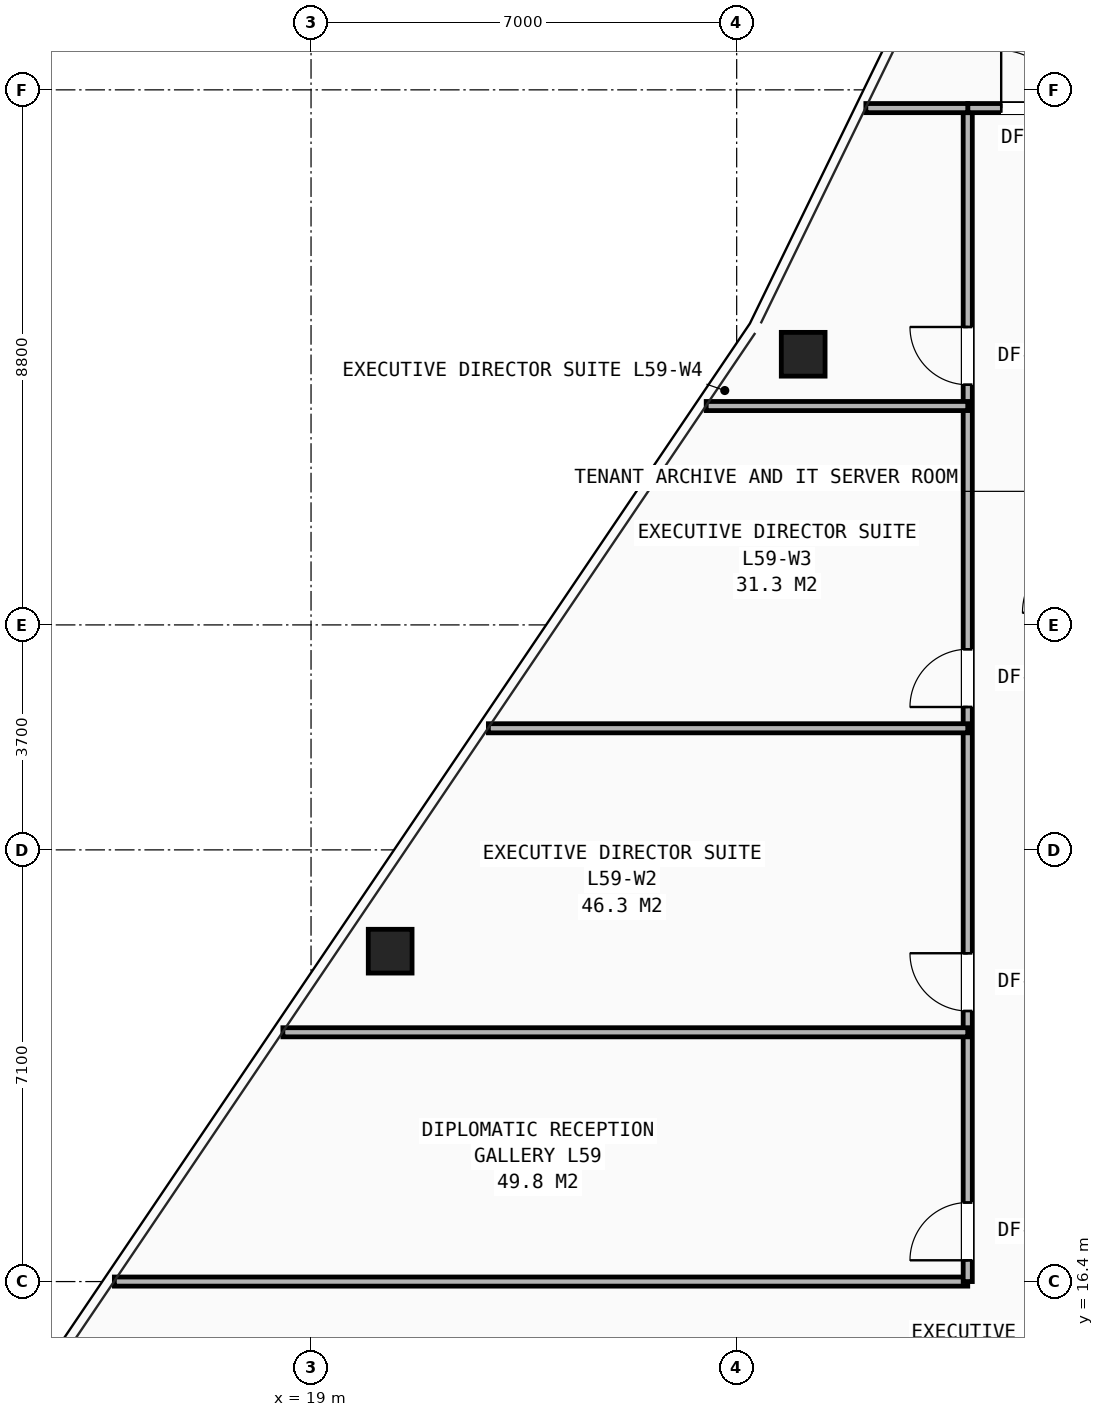
"""IFC4 building model, lengths in metres.
Left out: names, types, materials, properties, quantities, classifications, styles, units other than length and angle.
Written with IfcOpenShell. Run it as: python <this file> out.ifc"""

import sys

from ifc_helpers import new_model, si_unit, direction, frame, frame_2d, origin, origin_2d, place, context, subcontext, project, spatial, rectangle, hollow_rectangle, extrude, element, fill, save


model = new_model("IFC4")
c1 = context("Model", 3, precision=1e-05, world=origin(), true_north=direction((0.0, 1.0)))
c2 = subcontext(c1, "Body", "Model", "MODEL_VIEW")
j1 = project(units=[si_unit("LENGTHUNIT", "METRE"), si_unit("PLANEANGLEUNIT", "RADIAN")], contexts=[c1])
p1 = place(None, origin())
s1 = spatial("IfcSite", under=j1, at=p1, CompositionType="ELEMENT")
p2 = place(p1, origin())
s2 = spatial("IfcBuilding", under=s1, at=p2, CompositionType="ELEMENT")
p3 = place(p2, frame((0.0, 0.0, 208.4)))
s3 = spatial("IfcBuildingStorey", under=s2, at=p3, CompositionType="ELEMENT", Elevation=208.4)
for number, where, z_axis, x_axis in (
    (1, (27.094, 31.652, 0.0), (0.0, 0.0, 1.0), (1.0, 0.0, 0.0)),
    (2, (20.302, 21.834, 0.0), (0.0, 0.0, 1.0), (1.0, 0.0, 0.0)),
):
    element("IfcColumn", number, at=place(p3, frame(where, z_axis=z_axis, x_axis=x_axis)), inside=s3, PredefinedType="COLUMN", context=c2, shape_type="SweptSolid", body=[
        extrude(hollow_rectangle(XDim=0.72, YDim=0.72, WallThickness=0.05, at=origin_2d()), origin(), (0.0, 0.0, 1.0), 3.5),
    ])
p4 = place(p3, frame((15.766, 16.4, 0.0), z_axis=(0.0, 0.0, 1.0), x_axis=(1.0, 0.0, 0.0)))
e3 = element("IfcWall", 3, at=p4, inside=s3, PredefinedType="PARTITIONING", context=c2, shape_type="SweptSolid", body=[
    extrude(rectangle(XDim=14.034, YDim=0.15, at=frame_2d((7.017, 0.0))), origin(), (0.0, 0.0, 1.0), 2.292),
])
p5 = place(p3, frame((29.8, 16.4, 0.0), z_axis=(0.0, 0.0, 1.0), x_axis=(0.0, 1.0, 0.0)))
e4 = element("IfcWall", 4, at=p5, inside=s3, PredefinedType="PARTITIONING", context=c2, shape_type="SweptSolid", body=[
    extrude(rectangle(XDim=19.3, YDim=0.15, at=frame_2d((9.65, 0.0))), origin(), (0.0, 0.0, 1.0), 2.292),
])
p6 = place(p5, frame((0.35, 0.0, 0.0)))
e5 = element("IfcOpeningElement", 5, at=p6, cuts=e4, PredefinedType="OPENING", context=c2, shape_type="SweptSolid", body=[
    extrude(rectangle(XDim=0.95, YDim=2.1, at=frame_2d((0.475, 1.05))), frame((0.0, 0.085, 0.0), z_axis=(0.0, -1.0, 0.0), x_axis=(1.0, 0.0, 0.0)), (0.0, 0.0, 1.0), 0.17),
])
p7 = place(p5, frame((4.45, 0.0, 0.0)))
e6 = element("IfcOpeningElement", 6, at=p7, cuts=e4, PredefinedType="OPENING", context=c2, shape_type="SweptSolid", body=[
    extrude(rectangle(XDim=0.95, YDim=2.1, at=frame_2d((0.475, 1.05))), frame((0.0, 0.085, 0.0), z_axis=(0.0, -1.0, 0.0), x_axis=(1.0, 0.0, 0.0)), (0.0, 0.0, 1.0), 0.17),
])
p8 = place(p5, frame((9.45, 0.0, 0.0)))
e7 = element("IfcOpeningElement", 7, at=p8, cuts=e4, PredefinedType="OPENING", context=c2, shape_type="SweptSolid", body=[
    extrude(rectangle(XDim=0.95, YDim=2.1, at=frame_2d((0.475, 1.05))), frame((0.0, 0.085, 0.0), z_axis=(0.0, -1.0, 0.0), x_axis=(1.0, 0.0, 0.0)), (0.0, 0.0, 1.0), 0.17),
])
p9 = place(p5, frame((14.75, 0.0, 0.0)))
e8 = element("IfcOpeningElement", 8, at=p9, cuts=e4, PredefinedType="OPENING", context=c2, shape_type="SweptSolid", body=[
    extrude(rectangle(XDim=0.95, YDim=2.1, at=frame_2d((0.475, 1.05))), frame((0.0, 0.085, 0.0), z_axis=(0.0, -1.0, 0.0), x_axis=(1.0, 0.0, 0.0)), (0.0, 0.0, 1.0), 0.17),
])
p10 = place(p3, frame((29.8, 35.7, 0.0), z_axis=(0.0, 0.0, 1.0), x_axis=(1.0, 0.0, 0.0)))
e9 = element("IfcWall", 9, at=p10, inside=s3, PredefinedType="PARTITIONING", context=c2, shape_type="SweptSolid", body=[
    extrude(rectangle(XDim=9.45, YDim=0.15, at=frame_2d((4.725, 0.0))), origin(), (0.0, 0.0, 1.0), 2.833),
])
p11 = place(p10, frame((0.55, 0.0, 0.0)))
e10 = element("IfcOpeningElement", 10, at=p11, cuts=e9, PredefinedType="OPENING", context=c2, shape_type="SweptSolid", body=[
    extrude(rectangle(XDim=0.95, YDim=2.1, at=frame_2d((0.475, 1.05))), frame((0.0, 0.085, 0.0), z_axis=(0.0, -1.0, 0.0), x_axis=(1.0, 0.0, 0.0)), (0.0, 0.0, 1.0), 0.17),
])
p12 = place(p10, frame((6.05, 0.0, 0.0)))
e11 = element("IfcOpeningElement", 11, at=p12, cuts=e9, PredefinedType="OPENING", context=c2, shape_type="SweptSolid", body=[
    extrude(rectangle(XDim=0.95, YDim=2.1, at=frame_2d((0.475, 1.05))), frame((0.0, 0.085, 0.0), z_axis=(0.0, -1.0, 0.0), x_axis=(1.0, 0.0, 0.0)), (0.0, 0.0, 1.0), 0.17),
])
p13 = place(p3, frame((28.124, 35.7, 0.0), z_axis=(0.0, 0.0, 1.0), x_axis=(1.0, 0.0, 0.0)))
e12 = element("IfcWall", 12, at=p13, inside=s3, PredefinedType="PARTITIONING", context=c2, shape_type="SweptSolid", body=[
    extrude(rectangle(XDim=1.676, YDim=0.15, at=frame_2d((0.838, 0.0))), origin(), (0.0, 0.0, 1.0), 2.628),
])
p14 = place(p3, frame((18.537, 20.5, 0.0), z_axis=(0.0, 0.0, 1.0), x_axis=(1.0, 0.0, 0.0)))
e13 = element("IfcWall", 13, at=p14, inside=s3, PredefinedType="PARTITIONING", context=c2, shape_type="SweptSolid", body=[
    extrude(rectangle(XDim=11.263, YDim=0.15, at=frame_2d((5.632, 0.0))), origin(), (0.0, 0.0, 1.0), 2.292),
])
p15 = place(p3, frame((21.917, 25.5, 0.0), z_axis=(0.0, 0.0, 1.0), x_axis=(1.0, 0.0, 0.0)))
e14 = element("IfcWall", 14, at=p15, inside=s3, PredefinedType="PARTITIONING", context=c2, shape_type="SweptSolid", body=[
    extrude(rectangle(XDim=7.884, YDim=0.15, at=frame_2d((3.942, 0.0))), origin(), (0.0, 0.0, 1.0), 2.628),
])
p16 = place(p3, frame((25.499, 30.8, 0.0), z_axis=(0.0, 0.0, 1.0), x_axis=(1.0, 0.0, 0.0)))
e15 = element("IfcWall", 15, at=p16, inside=s3, PredefinedType="PARTITIONING", context=c2, shape_type="SweptSolid", body=[
    extrude(rectangle(XDim=4.301, YDim=0.15, at=frame_2d((2.151, 0.0))), origin(), (0.0, 0.0, 1.0), 2.628),
])
p17 = place(p6, origin())
e16 = element("IfcDoor", 16, at=p17, inside=s3, OperationType="SINGLE_SWING_LEFT", PredefinedType="DOOR", context=c2, shape_type="SweptSolid", body=[
    extrude(rectangle(XDim=0.95, YDim=2.1, at=frame_2d((0.475, 1.05))), frame((0.0, 0.025, 0.0), z_axis=(0.0, -1.0, 0.0), x_axis=(1.0, 0.0, 0.0)), (0.0, 0.0, 1.0), 0.05),
])
fill(e5, e16)
p18 = place(p7, origin())
e17 = element("IfcDoor", 17, at=p18, inside=s3, OperationType="SINGLE_SWING_RIGHT", PredefinedType="DOOR", context=c2, shape_type="SweptSolid", body=[
    extrude(rectangle(XDim=0.95, YDim=2.1, at=frame_2d((0.475, 1.05))), frame((0.0, 0.025, 0.0), z_axis=(0.0, -1.0, 0.0), x_axis=(1.0, 0.0, 0.0)), (0.0, 0.0, 1.0), 0.05),
])
fill(e6, e17)
p19 = place(p8, origin())
e18 = element("IfcDoor", 18, at=p19, inside=s3, OperationType="SINGLE_SWING_LEFT", PredefinedType="DOOR", context=c2, shape_type="SweptSolid", body=[
    extrude(rectangle(XDim=0.95, YDim=2.1, at=frame_2d((0.475, 1.05))), frame((0.0, 0.025, 0.0), z_axis=(0.0, -1.0, 0.0), x_axis=(1.0, 0.0, 0.0)), (0.0, 0.0, 1.0), 0.05),
])
fill(e7, e18)
p20 = place(p9, origin())
e19 = element("IfcDoor", 19, at=p20, inside=s3, OperationType="SINGLE_SWING_RIGHT", PredefinedType="DOOR", context=c2, shape_type="SweptSolid", body=[
    extrude(rectangle(XDim=0.95, YDim=2.1, at=frame_2d((0.475, 1.05))), frame((0.0, 0.025, 0.0), z_axis=(0.0, -1.0, 0.0), x_axis=(1.0, 0.0, 0.0)), (0.0, 0.0, 1.0), 0.05),
])
fill(e8, e19)
p21 = place(p11, origin())
e20 = element("IfcDoor", 20, at=p21, inside=s3, OperationType="SINGLE_SWING_LEFT", PredefinedType="DOOR", context=c2, shape_type="SweptSolid", body=[
    extrude(rectangle(XDim=0.95, YDim=2.1, at=frame_2d((0.475, 1.05))), frame((0.0, 0.025, 0.0), z_axis=(0.0, -1.0, 0.0), x_axis=(1.0, 0.0, 0.0)), (0.0, 0.0, 1.0), 0.05),
])
fill(e10, e20)
save(model, sys.argv[1])
